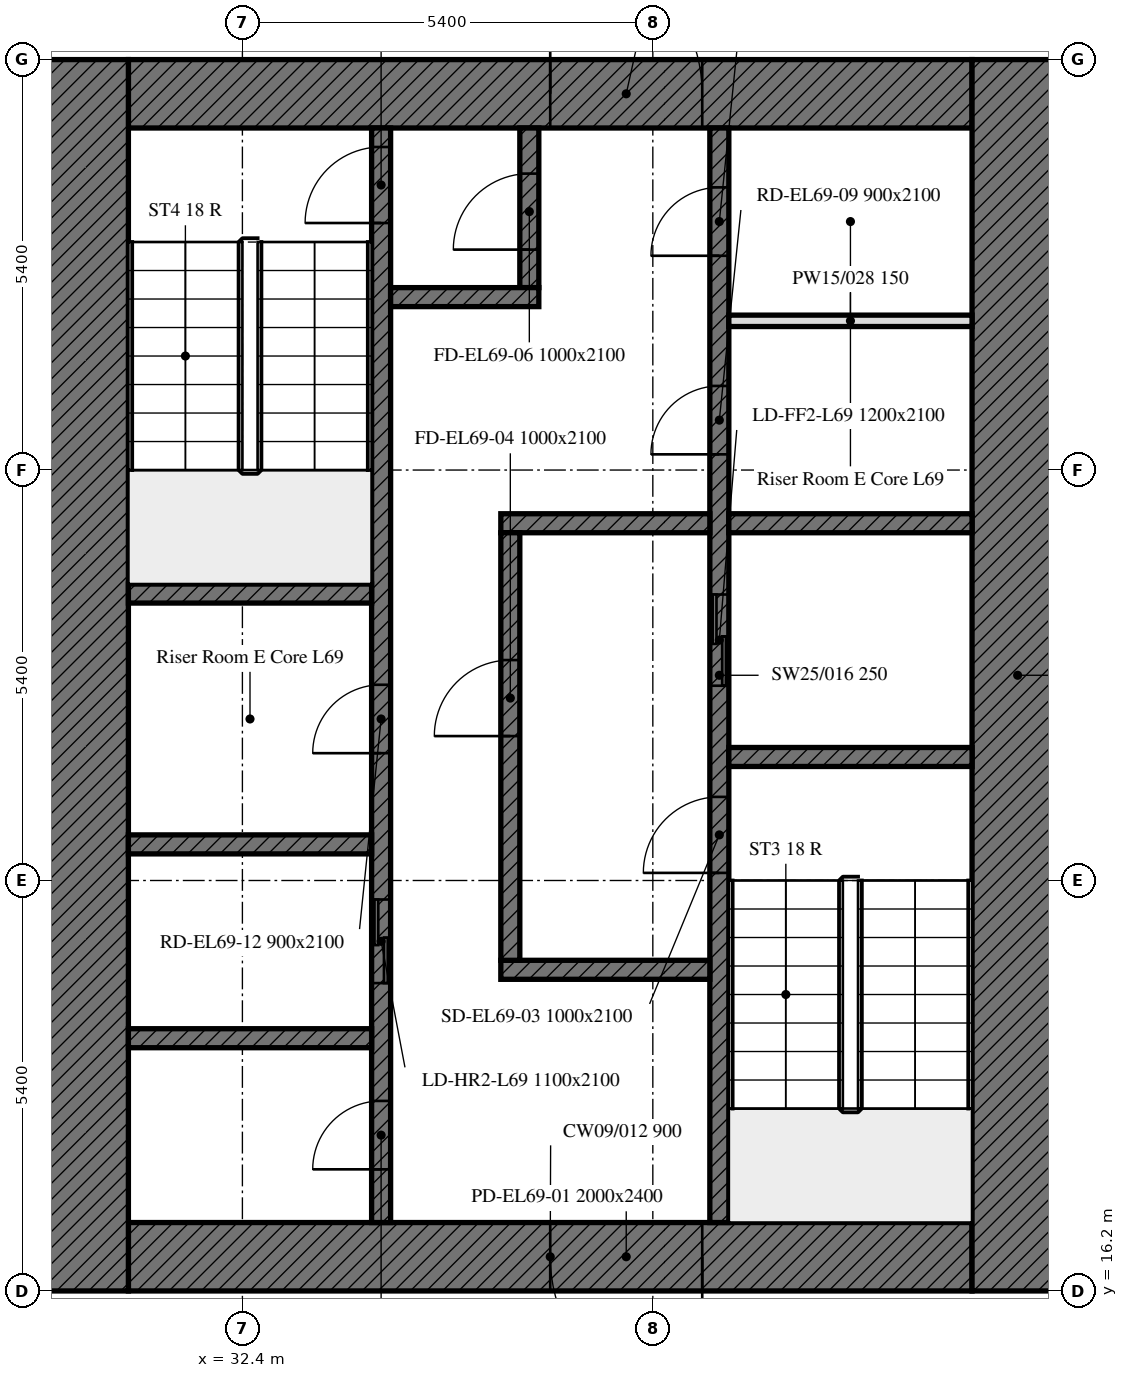
"""IFC4 building model, lengths in metres.
Left out: names, types, materials, properties, quantities, classifications, styles, units other than length and angle.
Written with IfcOpenShell. Run it as: python <this file> out.ifc"""

import sys

from ifc_helpers import new_model, si_unit, direction, frame, frame_2d, origin, place, context, subcontext, project, spatial, rectangle, extrude, element, fill, save


model = new_model("IFC4")
c1 = context("Model", 3, precision=1e-05, world=origin(), true_north=direction((0.0, 1.0)))
c2 = subcontext(c1, "Body", "Model", "MODEL_VIEW")
j1 = project(units=[si_unit("LENGTHUNIT", "METRE"), si_unit("PLANEANGLEUNIT", "RADIAN")], contexts=[c1])
p1 = place(None, origin())
s1 = spatial("IfcSite", under=j1, at=p1, CompositionType="ELEMENT")
p2 = place(p1, origin())
s2 = spatial("IfcBuilding", under=s1, at=p2, CompositionType="ELEMENT")
p3 = place(p2, frame((0.0, 0.0, 281.8)))
s3 = spatial("IfcBuildingStorey", under=s2, at=p3, CompositionType="ELEMENT", Elevation=281.8)
p4 = place(p3, frame((42.0, 16.65, 0.0), z_axis=(0.0, 0.0, 1.0), x_axis=(-1.0, 0.0, 0.0)))
e1 = element("IfcWall", 1, at=p4, inside=s3, PredefinedType="SOLIDWALL", context=c2, shape_type="SweptSolid", body=[
    extrude(rectangle(XDim=11.1, YDim=0.9, at=frame_2d((5.55, 0.0))), origin(), (0.0, 0.0, 1.0), 3.0),
])
p5 = place(p4, frame((3.55, 0.0, 0.0)))
e2 = element("IfcOpeningElement", 2, at=p5, cuts=e1, PredefinedType="OPENING", context=c2, shape_type="SweptSolid", body=[
    extrude(rectangle(XDim=2.0, YDim=2.4, at=frame_2d((1.0, 1.2))), frame((0.0, 0.45, 0.0), z_axis=(0.0, -1.0, 0.0), x_axis=(1.0, 0.0, 0.0)), (0.0, 0.0, 1.0), 0.9),
])
p6 = place(p3, frame((30.9, 31.95, 0.0), z_axis=(0.0, 0.0, 1.0), x_axis=(1.0, 0.0, 0.0)))
e3 = element("IfcWall", 3, at=p6, inside=s3, PredefinedType="SOLIDWALL", context=c2, shape_type="SweptSolid", body=[
    extrude(rectangle(XDim=11.1, YDim=0.9, at=frame_2d((5.55, 0.0))), origin(), (0.0, 0.0, 1.0), 3.0),
])
p7 = place(p6, frame((5.55, 0.0, 0.0)))
e4 = element("IfcOpeningElement", 4, at=p7, cuts=e3, PredefinedType="OPENING", context=c2, shape_type="SweptSolid", body=[
    extrude(rectangle(XDim=2.0, YDim=2.4, at=frame_2d((1.0, 1.2))), frame((0.0, 0.45, 0.0), z_axis=(0.0, -1.0, 0.0), x_axis=(1.0, 0.0, 0.0)), (0.0, 0.0, 1.0), 0.9),
])
for number, where, z_axis, x_axis in (
    (5, (42.6, 32.4, 0.0), (0.0, 0.0, 1.0), (0.0, -1.0, 0.0)),
    (6, (30.3, 16.2, 0.0), (0.0, 0.0, 1.0), (0.0, 1.0, 0.0)),
):
    element("IfcWall", number, at=place(p3, frame(where, z_axis=z_axis, x_axis=x_axis)), inside=s3, PredefinedType="SOLIDWALL", context=c2, shape_type="SweptSolid", body=[
        extrude(rectangle(XDim=16.2, YDim=1.2, at=frame_2d((8.1, 0.0))), origin(), (0.0, 0.0, 1.0), 3.0),
    ])
p8 = place(p3, frame((38.675, 17.1, 0.0), z_axis=(0.0, 0.0, 1.0), x_axis=(0.0, 1.0, 0.0)))
e7 = element("IfcWall", 7, at=p8, inside=s3, PredefinedType="SOLIDWALL", context=c2, shape_type="SweptSolid", body=[
    extrude(rectangle(XDim=14.4, YDim=0.25, at=frame_2d((7.2, 0.0))), origin(), (0.0, 0.0, 1.0), 3.0),
])
p9 = place(p8, frame((4.6, 0.0, 0.0)))
e8 = element("IfcOpeningElement", 8, at=p9, cuts=e7, PredefinedType="OPENING", context=c2, shape_type="SweptSolid", body=[
    extrude(rectangle(XDim=1.0, YDim=2.1, at=frame_2d((0.5, 1.05))), frame((0.0, 0.125, 0.0), z_axis=(0.0, -1.0, 0.0), x_axis=(1.0, 0.0, 0.0)), (0.0, 0.0, 1.0), 0.25),
])
p10 = place(p8, frame((7.062, 0.0, 0.0)))
e9 = element("IfcOpeningElement", 9, at=p10, cuts=e7, PredefinedType="OPENING", context=c2, shape_type="SweptSolid", body=[
    extrude(rectangle(XDim=1.2, YDim=2.1, at=frame_2d((0.6, 1.05))), frame((0.0, 0.125, 0.0), z_axis=(0.0, -1.0, 0.0), x_axis=(1.0, 0.0, 0.0)), (0.0, 0.0, 1.0), 0.25),
])
p11 = place(p8, frame((10.106, 0.0, 0.0)))
e10 = element("IfcOpeningElement", 10, at=p11, cuts=e7, PredefinedType="OPENING", context=c2, shape_type="SweptSolid", body=[
    extrude(rectangle(XDim=0.9, YDim=2.1, at=frame_2d((0.45, 1.05))), frame((0.0, 0.125, 0.0), z_axis=(0.0, -1.0, 0.0), x_axis=(1.0, 0.0, 0.0)), (0.0, 0.0, 1.0), 0.25),
])
p12 = place(p8, frame((12.719, 0.0, 0.0)))
e11 = element("IfcOpeningElement", 11, at=p12, cuts=e7, PredefinedType="OPENING", context=c2, shape_type="SweptSolid", body=[
    extrude(rectangle(XDim=0.9, YDim=2.1, at=frame_2d((0.45, 1.05))), frame((0.0, 0.125, 0.0), z_axis=(0.0, -1.0, 0.0), x_axis=(1.0, 0.0, 0.0)), (0.0, 0.0, 1.0), 0.25),
])
p13 = place(p3, frame((34.225, 17.1, 0.0), z_axis=(0.0, 0.0, 1.0), x_axis=(0.0, 1.0, 0.0)))
e12 = element("IfcWall", 12, at=p13, inside=s3, PredefinedType="SOLIDWALL", context=c2, shape_type="SweptSolid", body=[
    extrude(rectangle(XDim=14.4, YDim=0.25, at=frame_2d((7.2, 0.0))), origin(), (0.0, 0.0, 1.0), 3.0),
])
p14 = place(p13, frame((13.15, 0.0, 0.0)))
e13 = element("IfcOpeningElement", 13, at=p14, cuts=e12, PredefinedType="OPENING", context=c2, shape_type="SweptSolid", body=[
    extrude(rectangle(XDim=1.0, YDim=2.1, at=frame_2d((0.5, 1.05))), frame((0.0, 0.125, 0.0), z_axis=(0.0, -1.0, 0.0), x_axis=(1.0, 0.0, 0.0)), (0.0, 0.0, 1.0), 0.25),
])
p15 = place(p13, frame((3.15, 0.0, 0.0)))
e14 = element("IfcOpeningElement", 14, at=p15, cuts=e12, PredefinedType="OPENING", context=c2, shape_type="SweptSolid", body=[
    extrude(rectangle(XDim=1.1, YDim=2.1, at=frame_2d((0.55, 1.05))), frame((0.0, 0.125, 0.0), z_axis=(0.0, -1.0, 0.0), x_axis=(1.0, 0.0, 0.0)), (0.0, 0.0, 1.0), 0.25),
])
p16 = place(p13, frame((0.7, 0.0, 0.0)))
e15 = element("IfcOpeningElement", 15, at=p16, cuts=e12, PredefinedType="OPENING", context=c2, shape_type="SweptSolid", body=[
    extrude(rectangle(XDim=0.9, YDim=2.1, at=frame_2d((0.45, 1.05))), frame((0.0, 0.125, 0.0), z_axis=(0.0, -1.0, 0.0), x_axis=(1.0, 0.0, 0.0)), (0.0, 0.0, 1.0), 0.25),
])
p17 = place(p13, frame((6.175, 0.0, 0.0)))
e16 = element("IfcOpeningElement", 16, at=p17, cuts=e12, PredefinedType="OPENING", context=c2, shape_type="SweptSolid", body=[
    extrude(rectangle(XDim=0.9, YDim=2.1, at=frame_2d((0.45, 1.05))), frame((0.0, 0.125, 0.0), z_axis=(0.0, -1.0, 0.0), x_axis=(1.0, 0.0, 0.0)), (0.0, 0.0, 1.0), 0.25),
])
p18 = place(p3, frame((38.8, 23.225, 0.0), z_axis=(0.0, 0.0, 1.0), x_axis=(1.0, 0.0, 0.0)))
e17 = element("IfcWall", 17, at=p18, inside=s3, PredefinedType="SOLIDWALL", context=c2, shape_type="SweptSolid", body=[
    extrude(rectangle(XDim=3.2, YDim=0.25, at=frame_2d((1.6, 0.0))), origin(), (0.0, 0.0, 1.0), 3.0),
])
for number, where, z_axis, x_axis in (
    (18, (30.9, 25.375, 0.0), (0.0, 0.0, 1.0), (1.0, 0.0, 0.0)),
    (19, (30.9, 22.075, 0.0), (0.0, 0.0, 1.0), (1.0, 0.0, 0.0)),
):
    element("IfcWall", number, at=place(p3, frame(where, z_axis=z_axis, x_axis=x_axis)), inside=s3, PredefinedType="SOLIDWALL", context=c2, shape_type="SweptSolid", body=[
        extrude(rectangle(XDim=3.2, YDim=0.25, at=frame_2d((1.6, 0.0))), origin(), (0.0, 0.0, 1.0), 3.0),
    ])
p19 = place(p3, frame((38.8, 26.3, 0.0), z_axis=(0.0, 0.0, 1.0), x_axis=(1.0, 0.0, 0.0)))
e20 = element("IfcWall", 20, at=p19, inside=s3, PredefinedType="SOLIDWALL", context=c2, shape_type="SweptSolid", body=[
    extrude(rectangle(XDim=3.2, YDim=0.25, at=frame_2d((1.6, 0.0))), origin(), (0.0, 0.0, 1.0), 3.0),
])
for number, where, z_axis, x_axis in (
    (21, (35.8, 26.3, 0.0), (0.0, 0.0, 1.0), (1.0, 0.0, 0.0)),
    (22, (35.8, 20.425, 0.0), (0.0, 0.0, 1.0), (1.0, 0.0, 0.0)),
):
    element("IfcWall", number, at=place(p3, frame(where, z_axis=z_axis, x_axis=x_axis)), inside=s3, PredefinedType="SOLIDWALL", context=c2, shape_type="SweptSolid", body=[
        extrude(rectangle(XDim=2.75, YDim=0.25, at=frame_2d((1.375, 0.0))), origin(), (0.0, 0.0, 1.0), 3.0),
    ])
p20 = place(p3, frame((36.175, 29.4, 0.0), z_axis=(0.0, 0.0, 1.0), x_axis=(0.0, 1.0, 0.0)))
e23 = element("IfcWall", 23, at=p20, inside=s3, PredefinedType="SOLIDWALL", context=c2, shape_type="SweptSolid", body=[
    extrude(rectangle(XDim=2.1, YDim=0.25, at=frame_2d((1.05, 0.0))), origin(), (0.0, 0.0, 1.0), 3.0),
])
p21 = place(p20, frame((0.5, 0.0, 0.0)))
e24 = element("IfcOpeningElement", 24, at=p21, cuts=e23, PredefinedType="OPENING", context=c2, shape_type="SweptSolid", body=[
    extrude(rectangle(XDim=1.0, YDim=2.1, at=frame_2d((0.5, 1.05))), frame((0.0, 0.125, 0.0), z_axis=(0.0, -1.0, 0.0), x_axis=(1.0, 0.0, 0.0)), (0.0, 0.0, 1.0), 0.25),
])
p22 = place(p3, frame((34.35, 29.275, 0.0), z_axis=(0.0, 0.0, 1.0), x_axis=(1.0, 0.0, 0.0)))
e25 = element("IfcWall", 25, at=p22, inside=s3, PredefinedType="SOLIDWALL", context=c2, shape_type="SweptSolid", body=[
    extrude(rectangle(XDim=1.95, YDim=0.25, at=frame_2d((0.975, 0.0))), origin(), (0.0, 0.0, 1.0), 3.0),
])
p23 = place(p3, frame((35.925, 20.55, 0.0), z_axis=(0.0, 0.0, 1.0), x_axis=(0.0, 1.0, 0.0)))
e26 = element("IfcWall", 26, at=p23, inside=s3, PredefinedType="SOLIDWALL", context=c2, shape_type="SweptSolid", body=[
    extrude(rectangle(XDim=5.625, YDim=0.25, at=frame_2d((2.812, 0.0))), origin(), (0.0, 0.0, 1.0), 3.0),
])
p24 = place(p23, frame((2.95, 0.0, 0.0)))
e27 = element("IfcOpeningElement", 27, at=p24, cuts=e26, PredefinedType="OPENING", context=c2, shape_type="SweptSolid", body=[
    extrude(rectangle(XDim=1.0, YDim=2.1, at=frame_2d((0.5, 1.05))), frame((0.0, 0.125, 0.0), z_axis=(0.0, -1.0, 0.0), x_axis=(1.0, 0.0, 0.0)), (0.0, 0.0, 1.0), 0.25),
])
p25 = place(p3, frame((30.9, 19.525, 0.0), z_axis=(0.0, 0.0, 1.0), x_axis=(1.0, 0.0, 0.0)))
e28 = element("IfcWall", 28, at=p25, inside=s3, PredefinedType="SOLIDWALL", context=c2, shape_type="SweptSolid", body=[
    extrude(rectangle(XDim=3.2, YDim=0.25, at=frame_2d((1.6, 0.0))), origin(), (0.0, 0.0, 1.0), 3.0),
])
p26 = place(p3, frame((38.8, 28.963, 0.0), z_axis=(0.0, 0.0, 1.0), x_axis=(1.0, 0.0, 0.0)))
e29 = element("IfcWall", 29, at=p26, inside=s3, PredefinedType="PARTITIONING", context=c2, shape_type="SweptSolid", body=[
    extrude(rectangle(XDim=3.2, YDim=0.15, at=frame_2d((1.6, 0.0))), origin(), (0.0, 0.0, 1.0), 3.0),
])
p27 = place(p5, origin())
e30 = element("IfcDoor", 30, at=p27, inside=s3, OperationType="DOUBLE_DOOR_SINGLE_SWING", PredefinedType="DOOR", context=c2, shape_type="SweptSolid", body=[
    extrude(rectangle(XDim=2.0, YDim=2.4, at=frame_2d((1.0, 1.2))), frame((0.0, 0.025, 0.0), z_axis=(0.0, -1.0, 0.0), x_axis=(1.0, 0.0, 0.0)), (0.0, 0.0, 1.0), 0.05),
])
fill(e2, e30)
p28 = place(p7, origin())
e31 = element("IfcDoor", 31, at=p28, inside=s3, OperationType="DOUBLE_DOOR_SINGLE_SWING", PredefinedType="DOOR", context=c2, shape_type="SweptSolid", body=[
    extrude(rectangle(XDim=2.0, YDim=2.4, at=frame_2d((1.0, 1.2))), frame((0.0, 0.025, 0.0), z_axis=(0.0, -1.0, 0.0), x_axis=(1.0, 0.0, 0.0)), (0.0, 0.0, 1.0), 0.05),
])
fill(e4, e31)
p29 = place(p9, origin())
e32 = element("IfcDoor", 32, at=p29, inside=s3, OperationType="SINGLE_SWING_LEFT", PredefinedType="DOOR", context=c2, shape_type="SweptSolid", body=[
    extrude(rectangle(XDim=1.0, YDim=2.1, at=frame_2d((0.5, 1.05))), frame((0.0, 0.025, 0.0), z_axis=(0.0, -1.0, 0.0), x_axis=(1.0, 0.0, 0.0)), (0.0, 0.0, 1.0), 0.05),
])
fill(e8, e32)
p30 = place(p24, origin())
e33 = element("IfcDoor", 33, at=p30, inside=s3, OperationType="SINGLE_SWING_LEFT", PredefinedType="DOOR", context=c2, shape_type="SweptSolid", body=[
    extrude(rectangle(XDim=1.0, YDim=2.1, at=frame_2d((0.5, 1.05))), frame((0.0, 0.025, 0.0), z_axis=(0.0, -1.0, 0.0), x_axis=(1.0, 0.0, 0.0)), (0.0, 0.0, 1.0), 0.05),
])
fill(e27, e33)
p31 = place(p14, origin())
e34 = element("IfcDoor", 34, at=p31, inside=s3, OperationType="SINGLE_SWING_LEFT", PredefinedType="DOOR", context=c2, shape_type="SweptSolid", body=[
    extrude(rectangle(XDim=1.0, YDim=2.1, at=frame_2d((0.5, 1.05))), frame((0.0, 0.025, 0.0), z_axis=(0.0, -1.0, 0.0), x_axis=(1.0, 0.0, 0.0)), (0.0, 0.0, 1.0), 0.05),
])
fill(e13, e34)
p32 = place(p21, origin())
e35 = element("IfcDoor", 35, at=p32, inside=s3, OperationType="SINGLE_SWING_LEFT", PredefinedType="DOOR", context=c2, shape_type="SweptSolid", body=[
    extrude(rectangle(XDim=1.0, YDim=2.1, at=frame_2d((0.5, 1.05))), frame((0.0, 0.025, 0.0), z_axis=(0.0, -1.0, 0.0), x_axis=(1.0, 0.0, 0.0)), (0.0, 0.0, 1.0), 0.05),
])
fill(e24, e35)
p33 = place(p10, origin())
e36 = element("IfcDoor", 36, at=p33, inside=s3, OperationType="DOUBLE_DOOR_SLIDING", PredefinedType="DOOR", context=c2, shape_type="SweptSolid", body=[
    extrude(rectangle(XDim=1.2, YDim=2.1, at=frame_2d((0.6, 1.05))), frame((0.0, 0.025, 0.0), z_axis=(0.0, -1.0, 0.0), x_axis=(1.0, 0.0, 0.0)), (0.0, 0.0, 1.0), 0.05),
])
fill(e9, e36)
p34 = place(p15, origin())
e37 = element("IfcDoor", 37, at=p34, inside=s3, OperationType="DOUBLE_DOOR_SLIDING", PredefinedType="DOOR", context=c2, shape_type="SweptSolid", body=[
    extrude(rectangle(XDim=1.1, YDim=2.1, at=frame_2d((0.55, 1.05))), frame((0.0, 0.025, 0.0), z_axis=(0.0, -1.0, 0.0), x_axis=(1.0, 0.0, 0.0)), (0.0, 0.0, 1.0), 0.05),
])
fill(e14, e37)
p35 = place(p11, origin())
e38 = element("IfcDoor", 38, at=p35, inside=s3, OperationType="SINGLE_SWING_LEFT", PredefinedType="DOOR", context=c2, shape_type="SweptSolid", body=[
    extrude(rectangle(XDim=0.9, YDim=2.1, at=frame_2d((0.45, 1.05))), frame((0.0, 0.025, 0.0), z_axis=(0.0, -1.0, 0.0), x_axis=(1.0, 0.0, 0.0)), (0.0, 0.0, 1.0), 0.05),
])
fill(e10, e38)
p36 = place(p12, origin())
e39 = element("IfcDoor", 39, at=p36, inside=s3, OperationType="SINGLE_SWING_LEFT", PredefinedType="DOOR", context=c2, shape_type="SweptSolid", body=[
    extrude(rectangle(XDim=0.9, YDim=2.1, at=frame_2d((0.45, 1.05))), frame((0.0, 0.025, 0.0), z_axis=(0.0, -1.0, 0.0), x_axis=(1.0, 0.0, 0.0)), (0.0, 0.0, 1.0), 0.05),
])
fill(e11, e39)
p37 = place(p16, origin())
e40 = element("IfcDoor", 40, at=p37, inside=s3, OperationType="SINGLE_SWING_LEFT", PredefinedType="DOOR", context=c2, shape_type="SweptSolid", body=[
    extrude(rectangle(XDim=0.9, YDim=2.1, at=frame_2d((0.45, 1.05))), frame((0.0, 0.025, 0.0), z_axis=(0.0, -1.0, 0.0), x_axis=(1.0, 0.0, 0.0)), (0.0, 0.0, 1.0), 0.05),
])
fill(e15, e40)
p38 = place(p17, origin())
e41 = element("IfcDoor", 41, at=p38, inside=s3, OperationType="SINGLE_SWING_LEFT", PredefinedType="DOOR", context=c2, shape_type="SweptSolid", body=[
    extrude(rectangle(XDim=0.9, YDim=2.1, at=frame_2d((0.45, 1.05))), frame((0.0, 0.025, 0.0), z_axis=(0.0, -1.0, 0.0), x_axis=(1.0, 0.0, 0.0)), (0.0, 0.0, 1.0), 0.05),
])
fill(e16, e41)
save(model, sys.argv[1])
